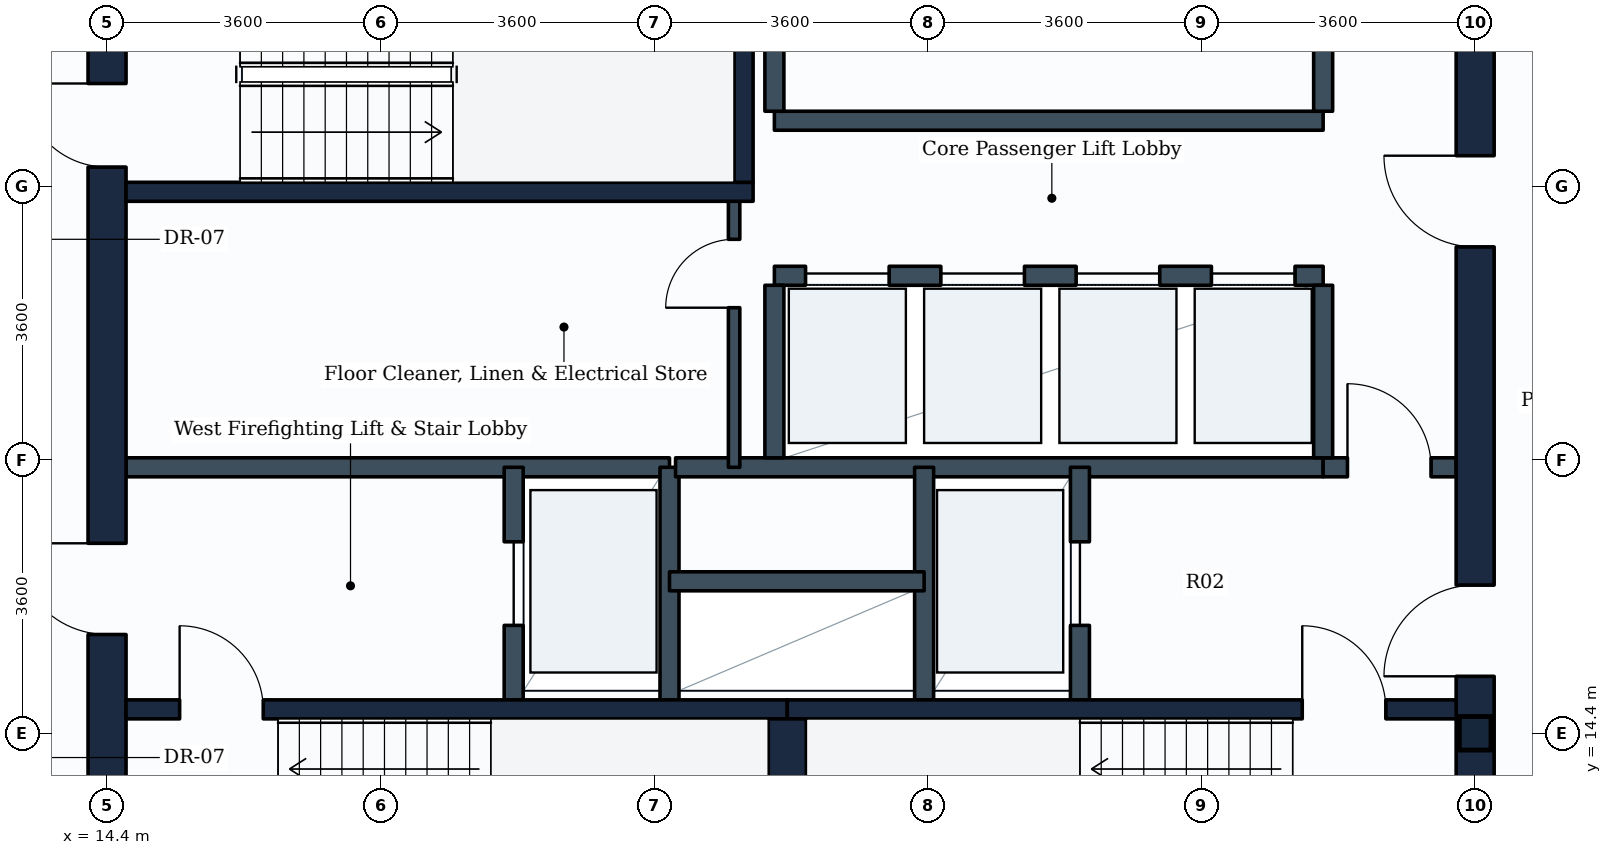
"""IFC4 building model, lengths in metres.
Left out: names, types, materials, properties, quantities, classifications, styles, units other than length and angle.
Written with IfcOpenShell. Run it as: python <this file> out.ifc"""

import sys

from ifc_helpers import new_model, si_unit, direction, frame, frame_2d, origin, origin_2d, place, context, subcontext, project, spatial, rectangle, i_section, extrude, element, fill, save


model = new_model("IFC4")
c1 = context("Model", 3, precision=1e-05, world=origin(), true_north=direction((0.0, 1.0)))
c2 = subcontext(c1, "Body", "Model", "MODEL_VIEW")
j1 = project(units=[si_unit("LENGTHUNIT", "METRE"), si_unit("PLANEANGLEUNIT", "RADIAN")], contexts=[c1])
p1 = place(None, origin())
s1 = spatial("IfcSite", under=j1, at=p1, CompositionType="ELEMENT")
p2 = place(p1, origin())
s2 = spatial("IfcBuilding", under=s1, at=p2, CompositionType="ELEMENT")
p3 = place(p2, frame((0.0, 0.0, 165.6)))
s3 = spatial("IfcBuildingStorey", under=s2, at=p3, CompositionType="ELEMENT", Elevation=165.6)
p4 = place(p3, frame((32.4, 14.4, 0.0), z_axis=(0.0, 0.0, 1.0), x_axis=(1.0, 0.0, 0.0)))
e1 = element("IfcColumn", 1, at=p4, inside=s3, PredefinedType="COLUMN", context=c2, shape_type="SweptSolid", body=[
    extrude(i_section(OverallWidth=0.416, OverallDepth=0.442, WebThickness=0.025, FlangeThickness=0.041, FilletRadius=0.015, at=origin_2d()), origin(), (0.0, 0.0, 1.0), 3.8),
])
p5 = place(p3, frame((14.4, 10.8, 0.0), z_axis=(0.0, 0.0, 1.0), x_axis=(0.0, 1.0, 0.0)))
e2 = element("IfcWall", 2, at=p5, inside=s3, PredefinedType="SHEAR", context=c2, shape_type="SweptSolid", body=[
    extrude(rectangle(XDim=14.4, YDim=0.5, at=frame_2d((7.2, 0.0))), origin(), (0.0, 0.0, 1.0), 3.48),
])
p6 = place(p5, frame((11.05, 0.0, 0.0)))
e3 = element("IfcOpeningElement", 3, at=p6, cuts=e2, PredefinedType="OPENING", context=c2, shape_type="SweptSolid", body=[
    extrude(rectangle(XDim=1.1, YDim=2.1, at=frame_2d((0.55, 1.05))), frame((0.0, 0.26, 0.0), z_axis=(0.0, -1.0, 0.0), x_axis=(1.0, 0.0, 0.0)), (0.0, 0.0, 1.0), 0.52),
])
p7 = place(p5, frame((4.9, 0.0, 0.0)))
e4 = element("IfcOpeningElement", 4, at=p7, cuts=e2, PredefinedType="OPENING", context=c2, shape_type="SweptSolid", body=[
    extrude(rectangle(XDim=1.2, YDim=2.1, at=frame_2d((0.6, 1.05))), frame((0.0, 0.26, 0.0), z_axis=(0.0, -1.0, 0.0), x_axis=(1.0, 0.0, 0.0)), (0.0, 0.0, 1.0), 0.52),
])
p8 = place(p3, frame((32.4, 10.8, 0.0), z_axis=(0.0, 0.0, 1.0), x_axis=(0.0, 1.0, 0.0)))
e5 = element("IfcWall", 5, at=p8, inside=s3, PredefinedType="SHEAR", context=c2, shape_type="SweptSolid", body=[
    extrude(rectangle(XDim=14.4, YDim=0.5, at=frame_2d((7.2, 0.0))), origin(), (0.0, 0.0, 1.0), 3.48),
])
p9 = place(p8, frame((4.35, 0.0, 0.0)))
e6 = element("IfcOpeningElement", 6, at=p9, cuts=e5, PredefinedType="OPENING", context=c2, shape_type="SweptSolid", body=[
    extrude(rectangle(XDim=1.2, YDim=2.1, at=frame_2d((0.6, 1.05))), frame((0.0, 0.26, 0.0), z_axis=(0.0, -1.0, 0.0), x_axis=(1.0, 0.0, 0.0)), (0.0, 0.0, 1.0), 0.52),
])
p10 = place(p8, frame((10.0, 0.0, 0.0)))
e7 = element("IfcOpeningElement", 7, at=p10, cuts=e5, PredefinedType="OPENING", context=c2, shape_type="SweptSolid", body=[
    extrude(rectangle(XDim=1.2, YDim=2.1, at=frame_2d((0.6, 1.05))), frame((0.0, 0.26, 0.0), z_axis=(0.0, -1.0, 0.0), x_axis=(1.0, 0.0, 0.0)), (0.0, 0.0, 1.0), 0.52),
])
p11 = place(p3, frame((14.65, 14.715, 0.0), z_axis=(0.0, 0.0, 1.0), x_axis=(1.0, 0.0, 0.0)))
e8 = element("IfcWall", 8, at=p11, inside=s3, PredefinedType="SHEAR", context=c2, shape_type="SweptSolid", body=[
    extrude(rectangle(XDim=8.7, YDim=0.25, at=frame_2d((4.35, 0.0))), origin(), (0.0, 0.0, 1.0), 3.48),
])
p12 = place(p11, frame((0.705, 0.0, 0.0)))
e9 = element("IfcOpeningElement", 9, at=p12, cuts=e8, PredefinedType="OPENING", context=c2, shape_type="SweptSolid", body=[
    extrude(rectangle(XDim=1.1, YDim=2.1, at=frame_2d((0.55, 1.05))), frame((0.0, 0.135, 0.0), z_axis=(0.0, -1.0, 0.0), x_axis=(1.0, 0.0, 0.0)), (0.0, 0.0, 1.0), 0.27),
])
p13 = place(p3, frame((23.35, 14.715, 0.0), z_axis=(0.0, 0.0, 1.0), x_axis=(1.0, 0.0, 0.0)))
e10 = element("IfcWall", 10, at=p13, inside=s3, PredefinedType="SHEAR", context=c2, shape_type="SweptSolid", body=[
    extrude(rectangle(XDim=8.8, YDim=0.25, at=frame_2d((4.4, 0.0))), origin(), (0.0, 0.0, 1.0), 3.48),
])
p14 = place(p13, frame((6.775, 0.0, 0.0)))
e11 = element("IfcOpeningElement", 11, at=p14, cuts=e10, PredefinedType="OPENING", context=c2, shape_type="SweptSolid", body=[
    extrude(rectangle(XDim=1.1, YDim=2.1, at=frame_2d((0.55, 1.05))), frame((0.0, 0.135, 0.0), z_axis=(0.0, -1.0, 0.0), x_axis=(1.0, 0.0, 0.0)), (0.0, 0.0, 1.0), 0.27),
])
p15 = place(p3, frame((23.35, 11.75, 0.0), z_axis=(0.0, 0.0, 1.0), x_axis=(0.0, 1.0, 0.0)))
e12 = element("IfcWall", 12, at=p15, inside=s3, PredefinedType="SHEAR", context=c2, shape_type="SweptSolid", body=[
    extrude(rectangle(XDim=2.84, YDim=0.5, at=frame_2d((1.42, 0.0))), origin(), (0.0, 0.0, 1.0), 3.48),
])
p16 = place(p3, frame((14.65, 21.525, 0.0), z_axis=(0.0, 0.0, 1.0), x_axis=(1.0, 0.0, 0.0)))
e13 = element("IfcWall", 13, at=p16, inside=s3, PredefinedType="SHEAR", context=c2, shape_type="SweptSolid", body=[
    extrude(rectangle(XDim=8.25, YDim=0.25, at=frame_2d((4.125, 0.0))), origin(), (0.0, 0.0, 1.0), 3.48),
])
p17 = place(p3, frame((22.775, 21.65, 0.0), z_axis=(0.0, 0.0, 1.0), x_axis=(0.0, 1.0, 0.0)))
e14 = element("IfcWall", 14, at=p17, inside=s3, PredefinedType="SHEAR", context=c2, shape_type="SweptSolid", body=[
    extrude(rectangle(XDim=2.84, YDim=0.25, at=frame_2d((1.42, 0.0))), origin(), (0.0, 0.0, 1.0), 3.48),
])
p18 = place(p3, frame((14.65, 17.9, 0.0), z_axis=(0.0, 0.0, 1.0), x_axis=(1.0, 0.0, 0.0)))
e15 = element("IfcWall", 15, at=p18, inside=s3, PredefinedType="PARTITIONING", context=c2, shape_type="SweptSolid", body=[
    extrude(rectangle(XDim=7.15, YDim=0.25, at=frame_2d((3.575, 0.0))), origin(), (0.0, 0.0, 1.0), 3.465),
])
p19 = place(p3, frame((19.75, 14.84, 0.0), z_axis=(0.0, 0.0, 1.0), x_axis=(0.0, 1.0, 0.0)))
e16 = element("IfcWall", 16, at=p19, inside=s3, PredefinedType="PARTITIONING", context=c2, shape_type="SweptSolid", body=[
    extrude(rectangle(XDim=3.06, YDim=0.25, at=frame_2d((1.53, 0.0))), origin(), (0.0, 0.0, 1.0), 3.465),
])
p20 = place(p19, frame((0.98, 0.0, 0.0)))
e17 = element("IfcOpeningElement", 17, at=p20, cuts=e16, PredefinedType="OPENING", context=c2, shape_type="SweptSolid", body=[
    extrude(rectangle(XDim=1.1, YDim=2.1, at=frame_2d((0.55, 1.05))), frame((0.0, 0.135, 0.0), z_axis=(0.0, -1.0, 0.0), x_axis=(1.0, 0.0, 0.0)), (0.0, 0.0, 1.0), 0.27),
])
p21 = place(p3, frame((21.8, 14.84, 0.0), z_axis=(0.0, 0.0, 1.0), x_axis=(0.0, 1.0, 0.0)))
e18 = element("IfcWall", 18, at=p21, inside=s3, PredefinedType="PARTITIONING", context=c2, shape_type="SweptSolid", body=[
    extrude(rectangle(XDim=3.06, YDim=0.25, at=frame_2d((1.53, 0.0))), origin(), (0.0, 0.0, 1.0), 3.465),
])
p22 = place(p3, frame((21.88, 17.9, 0.0), z_axis=(0.0, 0.0, 1.0), x_axis=(1.0, 0.0, 0.0)))
e19 = element("IfcWall", 19, at=p22, inside=s3, PredefinedType="PARTITIONING", context=c2, shape_type="SweptSolid", body=[
    extrude(rectangle(XDim=8.52, YDim=0.25, at=frame_2d((4.26, 0.0))), origin(), (0.0, 0.0, 1.0), 3.465),
])
p23 = place(p3, frame((30.4, 17.9, 0.0), z_axis=(0.0, 0.0, 1.0), x_axis=(1.0, 0.0, 0.0)))
e20 = element("IfcWall", 20, at=p23, inside=s3, PredefinedType="PARTITIONING", context=c2, shape_type="SweptSolid", body=[
    extrude(rectangle(XDim=1.75, YDim=0.25, at=frame_2d((0.875, 0.0))), origin(), (0.0, 0.0, 1.0), 3.465),
])
p24 = place(p23, frame((0.32, 0.0, 0.0)))
e21 = element("IfcOpeningElement", 21, at=p24, cuts=e20, PredefinedType="OPENING", context=c2, shape_type="SweptSolid", body=[
    extrude(rectangle(XDim=1.1, YDim=2.1, at=frame_2d((0.55, 1.05))), frame((0.0, 0.135, 0.0), z_axis=(0.0, -1.0, 0.0), x_axis=(1.0, 0.0, 0.0)), (0.0, 0.0, 1.0), 0.27),
])
p25 = place(p3, frame((25.15, 14.84, 0.0), z_axis=(0.0, 0.0, 1.0), x_axis=(0.0, 1.0, 0.0)))
e22 = element("IfcWall", 22, at=p25, inside=s3, PredefinedType="PARTITIONING", context=c2, shape_type="SweptSolid", body=[
    extrude(rectangle(XDim=3.06, YDim=0.25, at=frame_2d((1.53, 0.0))), origin(), (0.0, 0.0, 1.0), 3.465),
])
p26 = place(p3, frame((27.2, 14.84, 0.0), z_axis=(0.0, 0.0, 1.0), x_axis=(0.0, 1.0, 0.0)))
e23 = element("IfcWall", 23, at=p26, inside=s3, PredefinedType="PARTITIONING", context=c2, shape_type="SweptSolid", body=[
    extrude(rectangle(XDim=3.06, YDim=0.25, at=frame_2d((1.53, 0.0))), origin(), (0.0, 0.0, 1.0), 3.465),
])
p27 = place(p26, frame((0.98, 0.0, 0.0)))
e24 = element("IfcOpeningElement", 24, at=p27, cuts=e23, PredefinedType="OPENING", context=c2, shape_type="SweptSolid", body=[
    extrude(rectangle(XDim=1.1, YDim=2.1, at=frame_2d((0.55, 1.05))), frame((0.0, 0.135, 0.0), z_axis=(0.0, -1.0, 0.0), x_axis=(1.0, 0.0, 0.0)), (0.0, 0.0, 1.0), 0.27),
])
p28 = place(p3, frame((21.8, 16.4, 0.0), z_axis=(0.0, 0.0, 1.0), x_axis=(1.0, 0.0, 0.0)))
e25 = element("IfcWall", 25, at=p28, inside=s3, PredefinedType="PARTITIONING", context=c2, shape_type="SweptSolid", body=[
    extrude(rectangle(XDim=3.35, YDim=0.25, at=frame_2d((1.675, 0.0))), origin(), (0.0, 0.0, 1.0), 3.465),
])
p29 = place(p3, frame((23.18, 20.42, 0.0), z_axis=(0.0, 0.0, 1.0), x_axis=(1.0, 0.0, 0.0)))
e26 = element("IfcWall", 26, at=p29, inside=s3, PredefinedType="PARTITIONING", context=c2, shape_type="SweptSolid", body=[
    extrude(rectangle(XDim=7.22, YDim=0.25, at=frame_2d((3.61, 0.0))), origin(), (0.0, 0.0, 1.0), 3.465),
])
p30 = place(p29, frame((0.41, 0.0, 0.0)))
e27 = element("IfcOpeningElement", 27, at=p30, cuts=e26, PredefinedType="OPENING", context=c2, shape_type="SweptSolid", body=[
    extrude(rectangle(XDim=1.1, YDim=2.1, at=frame_2d((0.55, 1.05))), frame((0.0, 0.135, 0.0), z_axis=(0.0, -1.0, 0.0), x_axis=(1.0, 0.0, 0.0)), (0.0, 0.0, 1.0), 0.27),
])
p31 = place(p29, frame((2.19, 0.0, 0.0)))
e28 = element("IfcOpeningElement", 28, at=p31, cuts=e26, PredefinedType="OPENING", context=c2, shape_type="SweptSolid", body=[
    extrude(rectangle(XDim=1.1, YDim=2.1, at=frame_2d((0.55, 1.05))), frame((0.0, 0.135, 0.0), z_axis=(0.0, -1.0, 0.0), x_axis=(1.0, 0.0, 0.0)), (0.0, 0.0, 1.0), 0.27),
])
p32 = place(p29, frame((3.97, 0.0, 0.0)))
e29 = element("IfcOpeningElement", 29, at=p32, cuts=e26, PredefinedType="OPENING", context=c2, shape_type="SweptSolid", body=[
    extrude(rectangle(XDim=1.1, YDim=2.1, at=frame_2d((0.55, 1.05))), frame((0.0, 0.135, 0.0), z_axis=(0.0, -1.0, 0.0), x_axis=(1.0, 0.0, 0.0)), (0.0, 0.0, 1.0), 0.27),
])
p33 = place(p29, frame((5.75, 0.0, 0.0)))
e30 = element("IfcOpeningElement", 30, at=p33, cuts=e26, PredefinedType="OPENING", context=c2, shape_type="SweptSolid", body=[
    extrude(rectangle(XDim=1.1, YDim=2.1, at=frame_2d((0.55, 1.05))), frame((0.0, 0.135, 0.0), z_axis=(0.0, -1.0, 0.0), x_axis=(1.0, 0.0, 0.0)), (0.0, 0.0, 1.0), 0.27),
])
for number, where, z_axis, x_axis in (
    (31, (23.18, 18.025, 0.0), (0.0, 0.0, 1.0), (0.0, 1.0, 0.0)),
    (32, (30.4, 18.025, 0.0), (0.0, 0.0, 1.0), (0.0, 1.0, 0.0)),
):
    element("IfcWall", number, at=place(p3, frame(where, z_axis=z_axis, x_axis=x_axis)), inside=s3, PredefinedType="PARTITIONING", context=c2, shape_type="SweptSolid", body=[
        extrude(rectangle(XDim=2.27, YDim=0.25, at=frame_2d((1.135, 0.0))), origin(), (0.0, 0.0, 1.0), 3.465),
    ])
p34 = place(p3, frame((23.18, 22.46, 0.0), z_axis=(0.0, 0.0, 1.0), x_axis=(1.0, 0.0, 0.0)))
e33 = element("IfcWall", 33, at=p34, inside=s3, PredefinedType="PARTITIONING", context=c2, shape_type="SweptSolid", body=[
    extrude(rectangle(XDim=7.22, YDim=0.25, at=frame_2d((3.61, 0.0))), origin(), (0.0, 0.0, 1.0), 3.465),
])
for number, where, z_axis, x_axis in (
    (34, (23.18, 22.585, 0.0), (0.0, 0.0, 1.0), (0.0, 1.0, 0.0)),
    (35, (30.4, 22.585, 0.0), (0.0, 0.0, 1.0), (0.0, 1.0, 0.0)),
):
    element("IfcWall", number, at=place(p3, frame(where, z_axis=z_axis, x_axis=x_axis)), inside=s3, PredefinedType="PARTITIONING", context=c2, shape_type="SweptSolid", body=[
        extrude(rectangle(XDim=2.315, YDim=0.25, at=frame_2d((1.157, 0.0))), origin(), (0.0, 0.0, 1.0), 3.465),
    ])
p35 = place(p3, frame((22.65, 17.9, 0.0), z_axis=(0.0, 0.0, 1.0), x_axis=(0.0, 1.0, 0.0)))
e36 = element("IfcWall", 36, at=p35, inside=s3, PredefinedType="PARTITIONING", context=c2, shape_type="SweptSolid", body=[
    extrude(rectangle(XDim=3.625, YDim=0.15, at=frame_2d((1.812, 0.0))), origin(), (0.0, 0.0, 1.0), 3.465),
])
p36 = place(p35, frame((2.1, 0.0, 0.0)))
e37 = element("IfcOpeningElement", 37, at=p36, cuts=e36, PredefinedType="OPENING", context=c2, shape_type="SweptSolid", body=[
    extrude(rectangle(XDim=0.9, YDim=2.1, at=frame_2d((0.45, 1.05))), frame((0.0, 0.085, 0.0), z_axis=(0.0, -1.0, 0.0), x_axis=(1.0, 0.0, 0.0)), (0.0, 0.0, 1.0), 0.17),
])
p37 = place(p12, origin())
e38 = element("IfcDoor", 38, at=p37, inside=s3, OperationType="SINGLE_SWING_LEFT", PredefinedType="DOOR", context=c2, shape_type="SweptSolid", body=[
    extrude(rectangle(XDim=1.1, YDim=2.1, at=frame_2d((0.55, 1.05))), frame((0.0, 0.025, 0.0), z_axis=(0.0, -1.0, 0.0), x_axis=(1.0, 0.0, 0.0)), (0.0, 0.0, 1.0), 0.05),
])
fill(e9, e38)
p38 = place(p14, origin())
e39 = element("IfcDoor", 39, at=p38, inside=s3, OperationType="SINGLE_SWING_LEFT", PredefinedType="DOOR", context=c2, shape_type="SweptSolid", body=[
    extrude(rectangle(XDim=1.1, YDim=2.1, at=frame_2d((0.55, 1.05))), frame((0.0, 0.025, 0.0), z_axis=(0.0, -1.0, 0.0), x_axis=(1.0, 0.0, 0.0)), (0.0, 0.0, 1.0), 0.05),
])
fill(e11, e39)
p39 = place(p6, origin())
e40 = element("IfcDoor", 40, at=p39, inside=s3, OperationType="SINGLE_SWING_RIGHT", PredefinedType="DOOR", context=c2, shape_type="SweptSolid", body=[
    extrude(rectangle(XDim=1.1, YDim=2.1, at=frame_2d((0.55, 1.05))), frame((0.0, 0.025, 0.0), z_axis=(0.0, -1.0, 0.0), x_axis=(1.0, 0.0, 0.0)), (0.0, 0.0, 1.0), 0.05),
])
fill(e3, e40)
p40 = place(p20, origin())
e41 = element("IfcDoor", 41, at=p40, inside=s3, OperationType="SLIDING_TO_LEFT", PredefinedType="DOOR", context=c2, shape_type="SweptSolid", body=[
    extrude(rectangle(XDim=1.1, YDim=2.1, at=frame_2d((0.55, 1.05))), frame((0.0, 0.025, 0.0), z_axis=(0.0, -1.0, 0.0), x_axis=(1.0, 0.0, 0.0)), (0.0, 0.0, 1.0), 0.05),
])
fill(e17, e41)
p41 = place(p27, origin())
e42 = element("IfcDoor", 42, at=p41, inside=s3, OperationType="SLIDING_TO_LEFT", PredefinedType="DOOR", context=c2, shape_type="SweptSolid", body=[
    extrude(rectangle(XDim=1.1, YDim=2.1, at=frame_2d((0.55, 1.05))), frame((0.0, 0.025, 0.0), z_axis=(0.0, -1.0, 0.0), x_axis=(1.0, 0.0, 0.0)), (0.0, 0.0, 1.0), 0.05),
])
fill(e24, e42)
p42 = place(p7, origin())
e43 = element("IfcDoor", 43, at=p42, inside=s3, OperationType="SINGLE_SWING_RIGHT", PredefinedType="DOOR", context=c2, shape_type="SweptSolid", body=[
    extrude(rectangle(XDim=1.2, YDim=2.1, at=frame_2d((0.6, 1.05))), frame((0.0, 0.025, 0.0), z_axis=(0.0, -1.0, 0.0), x_axis=(1.0, 0.0, 0.0)), (0.0, 0.0, 1.0), 0.05),
])
fill(e4, e43)
p43 = place(p9, origin())
e44 = element("IfcDoor", 44, at=p43, inside=s3, OperationType="SINGLE_SWING_LEFT", PredefinedType="DOOR", context=c2, shape_type="SweptSolid", body=[
    extrude(rectangle(XDim=1.2, YDim=2.1, at=frame_2d((0.6, 1.05))), frame((0.0, 0.025, 0.0), z_axis=(0.0, -1.0, 0.0), x_axis=(1.0, 0.0, 0.0)), (0.0, 0.0, 1.0), 0.05),
])
fill(e6, e44)
p44 = place(p24, origin())
e45 = element("IfcDoor", 45, at=p44, inside=s3, OperationType="SINGLE_SWING_LEFT", PredefinedType="DOOR", context=c2, shape_type="SweptSolid", body=[
    extrude(rectangle(XDim=1.1, YDim=2.1, at=frame_2d((0.55, 1.05))), frame((0.0, 0.025, 0.0), z_axis=(0.0, -1.0, 0.0), x_axis=(1.0, 0.0, 0.0)), (0.0, 0.0, 1.0), 0.05),
])
fill(e21, e45)
p45 = place(p30, origin())
e46 = element("IfcDoor", 46, at=p45, inside=s3, OperationType="SLIDING_TO_LEFT", PredefinedType="DOOR", context=c2, shape_type="SweptSolid", body=[
    extrude(rectangle(XDim=1.1, YDim=2.1, at=frame_2d((0.55, 1.05))), frame((0.0, 0.025, 0.0), z_axis=(0.0, -1.0, 0.0), x_axis=(1.0, 0.0, 0.0)), (0.0, 0.0, 1.0), 0.05),
])
fill(e27, e46)
p46 = place(p31, origin())
e47 = element("IfcDoor", 47, at=p46, inside=s3, OperationType="SLIDING_TO_LEFT", PredefinedType="DOOR", context=c2, shape_type="SweptSolid", body=[
    extrude(rectangle(XDim=1.1, YDim=2.1, at=frame_2d((0.55, 1.05))), frame((0.0, 0.025, 0.0), z_axis=(0.0, -1.0, 0.0), x_axis=(1.0, 0.0, 0.0)), (0.0, 0.0, 1.0), 0.05),
])
fill(e28, e47)
p47 = place(p32, origin())
e48 = element("IfcDoor", 48, at=p47, inside=s3, OperationType="SLIDING_TO_LEFT", PredefinedType="DOOR", context=c2, shape_type="SweptSolid", body=[
    extrude(rectangle(XDim=1.1, YDim=2.1, at=frame_2d((0.55, 1.05))), frame((0.0, 0.025, 0.0), z_axis=(0.0, -1.0, 0.0), x_axis=(1.0, 0.0, 0.0)), (0.0, 0.0, 1.0), 0.05),
])
fill(e29, e48)
p48 = place(p33, origin())
e49 = element("IfcDoor", 49, at=p48, inside=s3, OperationType="SLIDING_TO_LEFT", PredefinedType="DOOR", context=c2, shape_type="SweptSolid", body=[
    extrude(rectangle(XDim=1.1, YDim=2.1, at=frame_2d((0.55, 1.05))), frame((0.0, 0.025, 0.0), z_axis=(0.0, -1.0, 0.0), x_axis=(1.0, 0.0, 0.0)), (0.0, 0.0, 1.0), 0.05),
])
fill(e30, e49)
p49 = place(p10, origin())
e50 = element("IfcDoor", 50, at=p49, inside=s3, OperationType="SINGLE_SWING_RIGHT", PredefinedType="DOOR", context=c2, shape_type="SweptSolid", body=[
    extrude(rectangle(XDim=1.2, YDim=2.1, at=frame_2d((0.6, 1.05))), frame((0.0, 0.025, 0.0), z_axis=(0.0, -1.0, 0.0), x_axis=(1.0, 0.0, 0.0)), (0.0, 0.0, 1.0), 0.05),
])
fill(e7, e50)
p50 = place(p36, origin())
e51 = element("IfcDoor", 51, at=p50, inside=s3, OperationType="SINGLE_SWING_LEFT", PredefinedType="DOOR", context=c2, shape_type="SweptSolid", body=[
    extrude(rectangle(XDim=0.9, YDim=2.1, at=frame_2d((0.45, 1.05))), frame((0.0, 0.025, 0.0), z_axis=(0.0, -1.0, 0.0), x_axis=(1.0, 0.0, 0.0)), (0.0, 0.0, 1.0), 0.05),
])
fill(e37, e51)
save(model, sys.argv[1])
